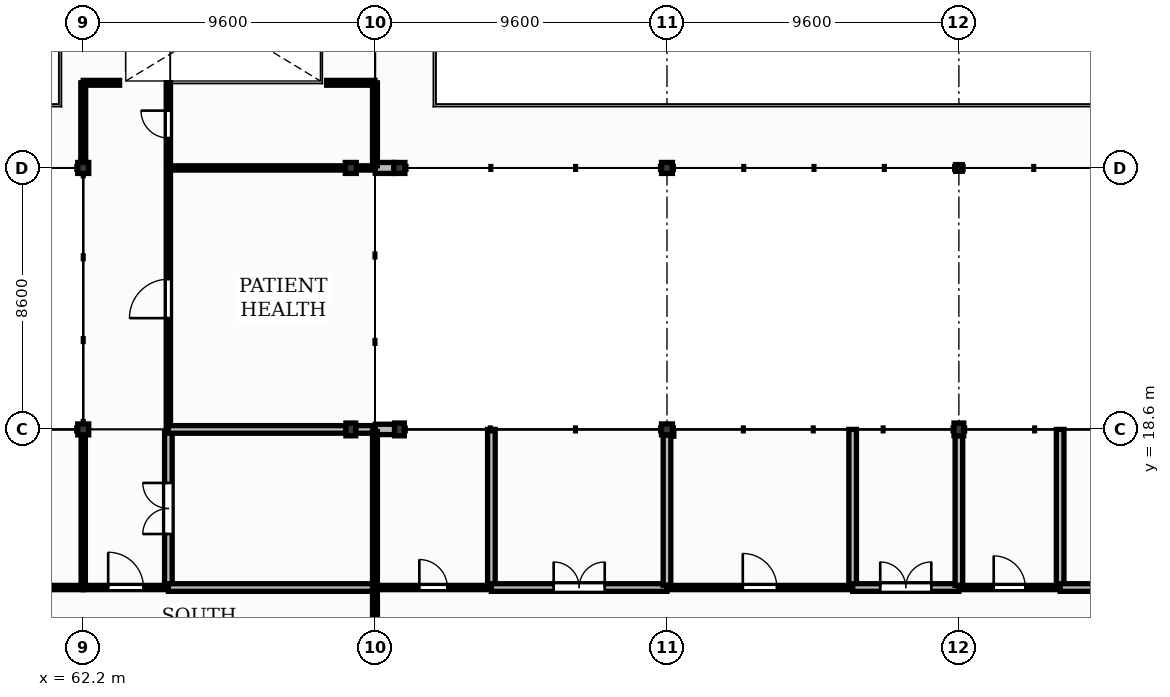
"""IFC4 building model, lengths in metres.
Left out: names, types, materials, properties, quantities, classifications, styles, units other than length and angle.
Written with IfcOpenShell. Run it as: python <this file> out.ifc"""

import sys

from ifc_helpers import new_model, si_unit, direction, frame, frame_2d, origin, origin_2d, place, context, subcontext, project, spatial, rectangle, hollow_circle, extrude, element, fill, save


model = new_model("IFC4")
c1 = context("Model", 3, precision=1e-05, world=origin(), true_north=direction((0.0, 1.0)))
c2 = subcontext(c1, "Body", "Model", "MODEL_VIEW")
j1 = project(units=[si_unit("LENGTHUNIT", "METRE"), si_unit("PLANEANGLEUNIT", "RADIAN")], contexts=[c1])
p1 = place(None, origin())
s1 = spatial("IfcSite", under=j1, at=p1, CompositionType="ELEMENT")
p2 = place(p1, origin())
s2 = spatial("IfcBuilding", under=s1, at=p2, CompositionType="ELEMENT")
p3 = place(p2, frame((0.0, 0.0, 4.5)))
s3 = spatial("IfcBuildingStorey", under=s2, at=p3, CompositionType="ELEMENT", Elevation=4.5)
p4 = place(p3, frame((72.6, 18.6, 0.0), z_axis=(0.0, 0.0, 1.0), x_axis=(1.0, 0.0, 0.0)))
e1 = element("IfcColumn", 1, at=p4, inside=s3, PredefinedType="COLUMN", context=c2, shape_type="SweptSolid", body=[
    extrude(rectangle(XDim=0.32, YDim=0.42, at=origin_2d()), origin(), (0.0, 0.0, 1.0), 4.26),
])
p5 = place(p3, frame((72.6, 27.2, 0.0), z_axis=(0.0, 0.0, 1.0), x_axis=(1.0, 0.0, 0.0)))
e2 = element("IfcColumn", 2, at=p5, inside=s3, PredefinedType="COLUMN", context=c2, shape_type="SweptSolid", body=[
    extrude(rectangle(XDim=0.36, YDim=0.36, at=origin_2d()), origin(), (0.0, 0.0, 1.0), 4.3),
])
p6 = place(p3, frame((81.4, 18.6, 0.0), z_axis=(0.0, 0.0, 1.0), x_axis=(1.0, 0.0, 0.0)))
e3 = element("IfcColumn", 3, at=p6, inside=s3, PredefinedType="COLUMN", context=c2, shape_type="SweptSolid", body=[
    extrude(rectangle(XDim=0.36, YDim=0.36, at=origin_2d()), origin(), (0.0, 0.0, 1.0), 4.26),
])
p7 = place(p3, frame((81.4, 27.2, 0.0), z_axis=(0.0, 0.0, 1.0), x_axis=(1.0, 0.0, 0.0)))
e4 = element("IfcColumn", 4, at=p7, inside=s3, PredefinedType="COLUMN", context=c2, shape_type="SweptSolid", body=[
    extrude(rectangle(XDim=0.36, YDim=0.36, at=origin_2d()), origin(), (0.0, 0.0, 1.0), 4.3),
])
p8 = place(p3, frame((91.0, 18.6, 0.0), z_axis=(0.0, 0.0, 1.0), x_axis=(1.0, 0.0, 0.0)))
e5 = element("IfcColumn", 5, at=p8, inside=s3, PredefinedType="COLUMN", context=c2, shape_type="SweptSolid", body=[
    extrude(rectangle(XDim=0.32, YDim=0.42, at=origin_2d()), origin(), (0.0, 0.0, 1.0), 4.26),
])
p9 = place(p3, frame((91.0, 27.2, 0.0), z_axis=(0.0, 0.0, 1.0), x_axis=(1.0, 0.0, 0.0)))
e6 = element("IfcColumn", 6, at=p9, inside=s3, PredefinedType="COLUMN", context=c2, shape_type="SweptSolid", body=[
    extrude(hollow_circle(Radius=0.11, WallThickness=0.01, at=origin_2d()), origin(), (0.0, 0.0, 1.0), 4.3),
])
p10 = place(p3, frame((62.2, 18.6, 0.0), z_axis=(0.0, 0.0, 1.0), x_axis=(1.0, 0.0, 0.0)))
e7 = element("IfcColumn", 7, at=p10, inside=s3, PredefinedType="COLUMN", context=c2, shape_type="SweptSolid", body=[
    extrude(rectangle(XDim=0.36, YDim=0.36, at=origin_2d()), origin(), (0.0, 0.0, 1.0), 4.26),
])
p11 = place(p3, frame((62.2, 27.2, 0.0), z_axis=(0.0, 0.0, 1.0), x_axis=(1.0, 0.0, 0.0)))
e8 = element("IfcColumn", 8, at=p11, inside=s3, PredefinedType="COLUMN", context=c2, shape_type="SweptSolid", body=[
    extrude(rectangle(XDim=0.36, YDim=0.36, at=origin_2d()), origin(), (0.0, 0.0, 1.0), 4.3),
])
p12 = place(p3, frame((71.0, 18.6, 0.0), z_axis=(0.0, 0.0, 1.0), x_axis=(1.0, 0.0, 0.0)))
e9 = element("IfcColumn", 9, at=p12, inside=s3, PredefinedType="COLUMN", context=c2, shape_type="SweptSolid", body=[
    extrude(rectangle(XDim=0.32, YDim=0.42, at=origin_2d()), origin(), (0.0, 0.0, 1.0), 4.26),
])
p13 = place(p3, frame((71.0, 27.2, 0.0), z_axis=(0.0, 0.0, 1.0), x_axis=(1.0, 0.0, 0.0)))
e10 = element("IfcColumn", 10, at=p13, inside=s3, PredefinedType="COLUMN", context=c2, shape_type="SweptSolid", body=[
    extrude(rectangle(XDim=0.36, YDim=0.36, at=origin_2d()), origin(), (0.0, 0.0, 1.0), 4.3),
])
p14 = place(p3, frame((71.805, 18.6, 0.0), z_axis=(0.0, 0.0, 1.0), x_axis=(1.0, 0.0, 0.0)))
e11 = element("IfcWall", 11, at=p14, inside=s3, PredefinedType="SOLIDWALL", context=c2, shape_type="SweptSolid", body=[
    extrude(rectangle(XDim=0.635, YDim=0.34, at=frame_2d((0.317, 0.0))), origin(), (0.0, 0.0, 1.0), 4.26),
])
p15 = place(p3, frame((71.805, 27.2, 0.0), z_axis=(0.0, 0.0, 1.0), x_axis=(1.0, 0.0, 0.0)))
e12 = element("IfcWall", 12, at=p15, inside=s3, PredefinedType="SOLIDWALL", context=c2, shape_type="SweptSolid", body=[
    extrude(rectangle(XDim=0.615, YDim=0.36, at=frame_2d((0.308, 0.0))), origin(), (0.0, 0.0, 1.0), 4.3),
])
p16 = place(p3, frame((58.233, 13.4, 0.0), z_axis=(0.0, 0.0, 1.0), x_axis=(1.0, 0.0, 0.0)))
e13 = element("IfcWall", 13, at=p16, inside=s3, PredefinedType="PARTITIONING", context=c2, shape_type="SweptSolid", body=[
    extrude(rectangle(XDim=3.967, YDim=0.14, at=frame_2d((1.983, 0.0))), origin(), (0.0, 0.0, 1.0), 4.18),
])
p17 = place(p16, frame((1.404, 0.0, 0.0)))
e14 = element("IfcOpeningElement", 14, at=p17, cuts=e13, PredefinedType="OPENING", context=c2, shape_type="SweptSolid", body=[
    extrude(rectangle(XDim=1.16, YDim=2.1, at=frame_2d((0.58, 1.05))), frame((0.0, 0.08, 0.0), z_axis=(0.0, -1.0, 0.0), x_axis=(1.0, 0.0, 0.0)), (0.0, 0.0, 1.0), 0.16),
])
p18 = place(p3, frame((62.2, 13.47, 0.0), z_axis=(0.0, 0.0, 1.0), x_axis=(0.0, 1.0, 0.0)))
e15 = element("IfcWall", 15, at=p18, inside=s3, PredefinedType="PARTITIONING", context=c2, shape_type="SweptSolid", body=[
    extrude(rectangle(XDim=4.95, YDim=0.14, at=frame_2d((2.475, 0.0))), origin(), (0.0, 0.0, 1.0), 3.74),
])
p19 = place(p3, frame((62.2, 13.4, 0.0), z_axis=(0.0, 0.0, 1.0), x_axis=(1.0, 0.0, 0.0)))
e16 = element("IfcWall", 16, at=p19, inside=s3, PredefinedType="PARTITIONING", context=c2, shape_type="SweptSolid", body=[
    extrude(rectangle(XDim=2.8, YDim=0.14, at=frame_2d((1.4, 0.0))), origin(), (0.0, 0.0, 1.0), 4.18),
])
p20 = place(p19, frame((0.82, 0.0, 0.0)))
e17 = element("IfcOpeningElement", 17, at=p20, cuts=e16, PredefinedType="OPENING", context=c2, shape_type="SweptSolid", body=[
    extrude(rectangle(XDim=1.16, YDim=2.1, at=frame_2d((0.58, 1.05))), frame((0.0, 0.08, 0.0), z_axis=(0.0, -1.0, 0.0), x_axis=(1.0, 0.0, 0.0)), (0.0, 0.0, 1.0), 0.16),
])
p21 = place(p3, frame((65.0, 13.47, 0.0), z_axis=(0.0, 0.0, 1.0), x_axis=(0.0, 1.0, 0.0)))
e18 = element("IfcWall", 18, at=p21, inside=s3, PredefinedType="SOLIDWALL", context=c2, shape_type="SweptSolid", body=[
    extrude(rectangle(XDim=5.06, YDim=0.25, at=frame_2d((2.53, 0.0))), origin(), (0.0, 0.0, 1.0), 4.18),
])
p22 = place(p21, frame((1.69, 0.0, 0.0)))
e19 = element("IfcOpeningElement", 19, at=p22, cuts=e18, PredefinedType="OPENING", context=c2, shape_type="SweptSolid", body=[
    extrude(rectangle(XDim=1.68, YDim=2.3, at=frame_2d((0.84, 1.15))), frame((0.0, 0.135, 0.0), z_axis=(0.0, -1.0, 0.0), x_axis=(1.0, 0.0, 0.0)), (0.0, 0.0, 1.0), 0.27),
])
p23 = place(p3, frame((65.0, 13.4, 0.0), z_axis=(0.0, 0.0, 1.0), x_axis=(1.0, 0.0, 0.0)))
e20 = element("IfcWall", 20, at=p23, inside=s3, PredefinedType="SOLIDWALL", context=c2, shape_type="SweptSolid", body=[
    extrude(rectangle(XDim=6.795, YDim=0.25, at=frame_2d((3.397, 0.0))), origin(), (0.0, 0.0, 1.0), 4.18),
])
p24 = place(p3, frame((65.0, 18.67, 0.0), z_axis=(0.0, 0.0, 1.0), x_axis=(0.0, 1.0, 0.0)))
e21 = element("IfcWall", 21, at=p24, inside=s3, PredefinedType="PARTITIONING", context=c2, shape_type="SweptSolid", body=[
    extrude(rectangle(XDim=8.46, YDim=0.14, at=frame_2d((4.23, 0.0))), origin(), (0.0, 0.0, 1.0), 4.18),
])
p25 = place(p24, frame((3.59, 0.0, 0.0)))
e22 = element("IfcOpeningElement", 22, at=p25, cuts=e21, PredefinedType="OPENING", context=c2, shape_type="SweptSolid", body=[
    extrude(rectangle(XDim=1.28, YDim=2.2, at=frame_2d((0.64, 1.1))), frame((0.0, 0.08, 0.0), z_axis=(0.0, -1.0, 0.0), x_axis=(1.0, 0.0, 0.0)), (0.0, 0.0, 1.0), 0.16),
])
p26 = place(p3, frame((65.0, 18.6, 0.0), z_axis=(0.0, 0.0, 1.0), x_axis=(1.0, 0.0, 0.0)))
e23 = element("IfcWall", 23, at=p26, inside=s3, PredefinedType="SOLIDWALL", context=c2, shape_type="SweptSolid", body=[
    extrude(rectangle(XDim=5.84, YDim=0.25, at=frame_2d((2.92, 0.0))), origin(), (0.0, 0.0, 1.0), 3.8),
])
p27 = place(p3, frame((71.16, 18.6, 0.0), z_axis=(0.0, 0.0, 1.0), x_axis=(1.0, 0.0, 0.0)))
e24 = element("IfcWall", 24, at=p27, inside=s3, PredefinedType="SOLIDWALL", context=c2, shape_type="SweptSolid", body=[
    extrude(rectangle(XDim=0.575, YDim=0.25, at=frame_2d((0.288, 0.0))), origin(), (0.0, 0.0, 1.0), 4.18),
])
p28 = place(p3, frame((65.0, 27.27, 0.0), z_axis=(0.0, 0.0, 1.0), x_axis=(0.0, 1.0, 0.0)))
e25 = element("IfcWall", 25, at=p28, inside=s3, PredefinedType="PARTITIONING", context=c2, shape_type="SweptSolid", body=[
    extrude(rectangle(XDim=2.73, YDim=0.14, at=frame_2d((1.365, 0.0))), origin(), (0.0, 0.0, 1.0), 4.18),
])
p29 = place(p28, frame((0.915, 0.0, 0.0)))
e26 = element("IfcOpeningElement", 26, at=p29, cuts=e25, PredefinedType="OPENING", context=c2, shape_type="SweptSolid", body=[
    extrude(rectangle(XDim=0.9, YDim=2.1, at=frame_2d((0.45, 1.05))), frame((0.0, 0.08, 0.0), z_axis=(0.0, -1.0, 0.0), x_axis=(1.0, 0.0, 0.0)), (0.0, 0.0, 1.0), 0.16),
])
p30 = place(p3, frame((65.0, 27.2, 0.0), z_axis=(0.0, 0.0, 1.0), x_axis=(1.0, 0.0, 0.0)))
e27 = element("IfcWall", 27, at=p30, inside=s3, PredefinedType="PARTITIONING", context=c2, shape_type="SweptSolid", body=[
    extrude(rectangle(XDim=5.82, YDim=0.14, at=frame_2d((2.91, 0.0))), origin(), (0.0, 0.0, 1.0), 3.85),
])
p31 = place(p3, frame((71.18, 27.2, 0.0), z_axis=(0.0, 0.0, 1.0), x_axis=(1.0, 0.0, 0.0)))
e28 = element("IfcWall", 28, at=p31, inside=s3, PredefinedType="PARTITIONING", context=c2, shape_type="SweptSolid", body=[
    extrude(rectangle(XDim=0.615, YDim=0.14, at=frame_2d((0.308, 0.0))), origin(), (0.0, 0.0, 1.0), 4.18),
])
p32 = place(p3, frame((71.805, 13.4, 0.0), z_axis=(0.0, 0.0, 1.0), x_axis=(1.0, 0.0, 0.0)))
e29 = element("IfcWall", 29, at=p32, inside=s3, PredefinedType="PARTITIONING", context=c2, shape_type="SweptSolid", body=[
    extrude(rectangle(XDim=3.819, YDim=0.14, at=frame_2d((1.91, 0.0))), origin(), (0.0, 0.0, 1.0), 4.18),
])
p33 = place(p32, frame((1.449, 0.0, 0.0)))
e30 = element("IfcOpeningElement", 30, at=p33, cuts=e29, PredefinedType="OPENING", context=c2, shape_type="SweptSolid", body=[
    extrude(rectangle(XDim=0.92, YDim=2.1, at=frame_2d((0.46, 1.05))), frame((0.0, 0.08, 0.0), z_axis=(0.0, -1.0, 0.0), x_axis=(1.0, 0.0, 0.0)), (0.0, 0.0, 1.0), 0.16),
])
p34 = place(p3, frame((75.624, 13.47, 0.0), z_axis=(0.0, 0.0, 1.0), x_axis=(0.0, 1.0, 0.0)))
e31 = element("IfcWall", 31, at=p34, inside=s3, PredefinedType="SOLIDWALL", context=c2, shape_type="SweptSolid", body=[
    extrude(rectangle(XDim=5.13, YDim=0.25, at=frame_2d((2.565, 0.0))), origin(), (0.0, 0.0, 1.0), 4.18),
])
p35 = place(p3, frame((75.624, 13.4, 0.0), z_axis=(0.0, 0.0, 1.0), x_axis=(1.0, 0.0, 0.0)))
e32 = element("IfcWall", 32, at=p35, inside=s3, PredefinedType="SOLIDWALL", context=c2, shape_type="SweptSolid", body=[
    extrude(rectangle(XDim=5.776, YDim=0.25, at=frame_2d((2.888, 0.0))), origin(), (0.0, 0.0, 1.0), 4.18),
])
p36 = place(p35, frame((2.048, 0.0, 0.0)))
e33 = element("IfcOpeningElement", 33, at=p36, cuts=e32, PredefinedType="OPENING", context=c2, shape_type="SweptSolid", body=[
    extrude(rectangle(XDim=1.68, YDim=2.3, at=frame_2d((0.84, 1.15))), frame((0.0, 0.135, 0.0), z_axis=(0.0, -1.0, 0.0), x_axis=(1.0, 0.0, 0.0)), (0.0, 0.0, 1.0), 0.27),
])
p37 = place(p3, frame((81.4, 13.47, 0.0), z_axis=(0.0, 0.0, 1.0), x_axis=(0.0, 1.0, 0.0)))
e34 = element("IfcWall", 34, at=p37, inside=s3, PredefinedType="SOLIDWALL", context=c2, shape_type="SweptSolid", body=[
    extrude(rectangle(XDim=4.95, YDim=0.25, at=frame_2d((2.475, 0.0))), origin(), (0.0, 0.0, 1.0), 3.74),
])
p38 = place(p3, frame((81.4, 13.4, 0.0), z_axis=(0.0, 0.0, 1.0), x_axis=(1.0, 0.0, 0.0)))
e35 = element("IfcWall", 35, at=p38, inside=s3, PredefinedType="PARTITIONING", context=c2, shape_type="SweptSolid", body=[
    extrude(rectangle(XDim=6.106, YDim=0.14, at=frame_2d((3.053, 0.0))), origin(), (0.0, 0.0, 1.0), 4.18),
])
p39 = place(p38, frame((2.493, 0.0, 0.0)))
e36 = element("IfcOpeningElement", 36, at=p39, cuts=e35, PredefinedType="OPENING", context=c2, shape_type="SweptSolid", body=[
    extrude(rectangle(XDim=1.12, YDim=2.15, at=frame_2d((0.56, 1.075))), frame((0.0, 0.08, 0.0), z_axis=(0.0, -1.0, 0.0), x_axis=(1.0, 0.0, 0.0)), (0.0, 0.0, 1.0), 0.16),
])
p40 = place(p3, frame((87.506, 13.47, 0.0), z_axis=(0.0, 0.0, 1.0), x_axis=(0.0, 1.0, 0.0)))
e37 = element("IfcWall", 37, at=p40, inside=s3, PredefinedType="SOLIDWALL", context=c2, shape_type="SweptSolid", body=[
    extrude(rectangle(XDim=5.13, YDim=0.25, at=frame_2d((2.565, 0.0))), origin(), (0.0, 0.0, 1.0), 4.18),
])
p41 = place(p3, frame((87.506, 13.4, 0.0), z_axis=(0.0, 0.0, 1.0), x_axis=(1.0, 0.0, 0.0)))
e38 = element("IfcWall", 38, at=p41, inside=s3, PredefinedType="SOLIDWALL", context=c2, shape_type="SweptSolid", body=[
    extrude(rectangle(XDim=3.494, YDim=0.25, at=frame_2d((1.747, 0.0))), origin(), (0.0, 0.0, 1.0), 4.18),
])
p42 = place(p41, frame((0.907, 0.0, 0.0)))
e39 = element("IfcOpeningElement", 39, at=p42, cuts=e38, PredefinedType="OPENING", context=c2, shape_type="SweptSolid", body=[
    extrude(rectangle(XDim=1.68, YDim=2.3, at=frame_2d((0.84, 1.15))), frame((0.0, 0.135, 0.0), z_axis=(0.0, -1.0, 0.0), x_axis=(1.0, 0.0, 0.0)), (0.0, 0.0, 1.0), 0.27),
])
p43 = place(p3, frame((91.0, 13.47, 0.0), z_axis=(0.0, 0.0, 1.0), x_axis=(0.0, 1.0, 0.0)))
e40 = element("IfcWall", 40, at=p43, inside=s3, PredefinedType="SOLIDWALL", context=c2, shape_type="SweptSolid", body=[
    extrude(rectangle(XDim=4.92, YDim=0.25, at=frame_2d((2.46, 0.0))), origin(), (0.0, 0.0, 1.0), 3.74),
])
p44 = place(p3, frame((91.0, 13.4, 0.0), z_axis=(0.0, 0.0, 1.0), x_axis=(1.0, 0.0, 0.0)))
e41 = element("IfcWall", 41, at=p44, inside=s3, PredefinedType="PARTITIONING", context=c2, shape_type="SweptSolid", body=[
    extrude(rectangle(XDim=3.331, YDim=0.14, at=frame_2d((1.666, 0.0))), origin(), (0.0, 0.0, 1.0), 4.18),
])
p45 = place(p44, frame((1.146, 0.0, 0.0)))
e42 = element("IfcOpeningElement", 42, at=p45, cuts=e41, PredefinedType="OPENING", context=c2, shape_type="SweptSolid", body=[
    extrude(rectangle(XDim=1.04, YDim=2.1, at=frame_2d((0.52, 1.05))), frame((0.0, 0.08, 0.0), z_axis=(0.0, -1.0, 0.0), x_axis=(1.0, 0.0, 0.0)), (0.0, 0.0, 1.0), 0.16),
])
p46 = place(p3, frame((94.331, 13.47, 0.0), z_axis=(0.0, 0.0, 1.0), x_axis=(0.0, 1.0, 0.0)))
e43 = element("IfcWall", 43, at=p46, inside=s3, PredefinedType="SOLIDWALL", context=c2, shape_type="SweptSolid", body=[
    extrude(rectangle(XDim=5.13, YDim=0.25, at=frame_2d((2.565, 0.0))), origin(), (0.0, 0.0, 1.0), 4.18),
])
p47 = place(p3, frame((94.331, 13.4, 0.0), z_axis=(0.0, 0.0, 1.0), x_axis=(1.0, 0.0, 0.0)))
e44 = element("IfcWall", 44, at=p47, inside=s3, PredefinedType="SOLIDWALL", context=c2, shape_type="SweptSolid", body=[
    extrude(rectangle(XDim=6.269, YDim=0.25, at=frame_2d((3.135, 0.0))), origin(), (0.0, 0.0, 1.0), 4.18),
])
p48 = place(p47, frame((2.294, 0.0, 0.0)))
e45 = element("IfcOpeningElement", 45, at=p48, cuts=e44, PredefinedType="OPENING", context=c2, shape_type="SweptSolid", body=[
    extrude(rectangle(XDim=1.68, YDim=2.3, at=frame_2d((0.84, 1.15))), frame((0.0, 0.135, 0.0), z_axis=(0.0, -1.0, 0.0), x_axis=(1.0, 0.0, 0.0)), (0.0, 0.0, 1.0), 0.27),
])
p49 = place(p3, frame((71.795, 10.87, 0.0), z_axis=(0.0, 0.0, 1.0), x_axis=(0.0, 1.0, 0.0)))
e46 = element("IfcWall", 46, at=p49, inside=s3, PredefinedType="PARTITIONING", context=c2, shape_type="SweptSolid", body=[
    extrude(rectangle(XDim=2.46, YDim=0.16, at=frame_2d((1.23, 0.0))), origin(), (0.0, 0.0, 1.0), 4.18),
])
p50 = place(p3, frame((63.395, 30.0, 0.0), z_axis=(0.0, 0.0, 1.0), x_axis=(-1.0, 0.0, 0.0)))
e47 = element("IfcWall", 47, at=p50, inside=s3, PredefinedType="PARTITIONING", context=c2, shape_type="SweptSolid", body=[
    extrude(rectangle(XDim=1.195, YDim=0.16, at=frame_2d((0.597, 0.0))), origin(), (0.0, 0.0, 1.0), 4.18),
])
p51 = place(p3, frame((62.2, 27.38, 0.0), z_axis=(0.0, 0.0, 1.0), x_axis=(0.0, 1.0, 0.0)))
e48 = element("IfcWall", 48, at=p51, inside=s3, PredefinedType="PARTITIONING", context=c2, shape_type="SweptSolid", body=[
    extrude(rectangle(XDim=2.62, YDim=0.16, at=frame_2d((1.31, 0.0))), origin(), (0.0, 0.0, 1.0), 4.18),
])
p52 = place(p3, frame((71.795, 27.27, 0.0), z_axis=(0.0, 0.0, 1.0), x_axis=(0.0, 1.0, 0.0)))
e49 = element("IfcWall", 49, at=p52, inside=s3, PredefinedType="PARTITIONING", context=c2, shape_type="SweptSolid", body=[
    extrude(rectangle(XDim=2.73, YDim=0.16, at=frame_2d((1.365, 0.0))), origin(), (0.0, 0.0, 1.0), 4.18),
])
p53 = place(p3, frame((71.795, 30.0, 0.0), z_axis=(0.0, 0.0, 1.0), x_axis=(-1.0, 0.0, 0.0)))
e50 = element("IfcWall", 50, at=p53, inside=s3, PredefinedType="PARTITIONING", context=c2, shape_type="SweptSolid", body=[
    extrude(rectangle(XDim=1.589, YDim=0.16, at=frame_2d((0.795, 0.0))), origin(), (0.0, 0.0, 1.0), 4.18),
])
p54 = place(p3, frame((71.795, 13.47, 0.0), z_axis=(0.0, 0.0, 1.0), x_axis=(0.0, 1.0, 0.0)))
e51 = element("IfcWall", 51, at=p54, inside=s3, PredefinedType="PARTITIONING", context=c2, shape_type="SweptSolid", body=[
    extrude(rectangle(XDim=5.06, YDim=0.16, at=frame_2d((2.53, 0.0))), origin(), (0.0, 0.0, 1.0), 4.18),
])
p55 = place(p20, origin())
e52 = element("IfcDoor", 52, at=p55, inside=s3, OperationType="SINGLE_SWING_LEFT", PredefinedType="DOOR", context=c2, shape_type="SweptSolid", body=[
    extrude(rectangle(XDim=1.16, YDim=2.1, at=frame_2d((0.58, 1.05))), frame((0.0, 0.025, 0.0), z_axis=(0.0, -1.0, 0.0), x_axis=(1.0, 0.0, 0.0)), (0.0, 0.0, 1.0), 0.05),
])
fill(e17, e52)
p56 = place(p29, origin())
e53 = element("IfcDoor", 53, at=p56, inside=s3, OperationType="SINGLE_SWING_RIGHT", PredefinedType="DOOR", context=c2, shape_type="SweptSolid", body=[
    extrude(rectangle(XDim=0.9, YDim=2.1, at=frame_2d((0.45, 1.05))), frame((0.0, 0.025, 0.0), z_axis=(0.0, -1.0, 0.0), x_axis=(1.0, 0.0, 0.0)), (0.0, 0.0, 1.0), 0.05),
])
fill(e26, e53)
p57 = place(p25, origin())
e54 = element("IfcDoor", 54, at=p57, inside=s3, OperationType="SINGLE_SWING_LEFT", PredefinedType="DOOR", context=c2, shape_type="SweptSolid", body=[
    extrude(rectangle(XDim=1.28, YDim=2.2, at=frame_2d((0.64, 1.1))), frame((0.0, 0.025, 0.0), z_axis=(0.0, -1.0, 0.0), x_axis=(1.0, 0.0, 0.0)), (0.0, 0.0, 1.0), 0.05),
])
fill(e22, e54)
p58 = place(p22, origin())
e55 = element("IfcDoor", 55, at=p58, inside=s3, OperationType="DOUBLE_DOOR_SINGLE_SWING", PredefinedType="DOOR", context=c2, shape_type="SweptSolid", body=[
    extrude(rectangle(XDim=1.68, YDim=2.3, at=frame_2d((0.84, 1.15))), frame((0.0, 0.025, 0.0), z_axis=(0.0, -1.0, 0.0), x_axis=(1.0, 0.0, 0.0)), (0.0, 0.0, 1.0), 0.05),
])
fill(e19, e55)
p59 = place(p33, origin())
e56 = element("IfcDoor", 56, at=p59, inside=s3, OperationType="SINGLE_SWING_LEFT", PredefinedType="DOOR", context=c2, shape_type="SweptSolid", body=[
    extrude(rectangle(XDim=0.92, YDim=2.1, at=frame_2d((0.46, 1.05))), frame((0.0, 0.025, 0.0), z_axis=(0.0, -1.0, 0.0), x_axis=(1.0, 0.0, 0.0)), (0.0, 0.0, 1.0), 0.05),
])
fill(e30, e56)
p60 = place(p36, origin())
e57 = element("IfcDoor", 57, at=p60, inside=s3, OperationType="DOUBLE_DOOR_SINGLE_SWING", PredefinedType="DOOR", context=c2, shape_type="SweptSolid", body=[
    extrude(rectangle(XDim=1.68, YDim=2.3, at=frame_2d((0.84, 1.15))), frame((0.0, 0.025, 0.0), z_axis=(0.0, -1.0, 0.0), x_axis=(1.0, 0.0, 0.0)), (0.0, 0.0, 1.0), 0.05),
])
fill(e33, e57)
p61 = place(p39, origin())
e58 = element("IfcDoor", 58, at=p61, inside=s3, OperationType="SINGLE_SWING_LEFT", PredefinedType="DOOR", context=c2, shape_type="SweptSolid", body=[
    extrude(rectangle(XDim=1.12, YDim=2.15, at=frame_2d((0.56, 1.075))), frame((0.0, 0.025, 0.0), z_axis=(0.0, -1.0, 0.0), x_axis=(1.0, 0.0, 0.0)), (0.0, 0.0, 1.0), 0.05),
])
fill(e36, e58)
p62 = place(p42, origin())
e59 = element("IfcDoor", 59, at=p62, inside=s3, OperationType="DOUBLE_DOOR_SINGLE_SWING", PredefinedType="DOOR", context=c2, shape_type="SweptSolid", body=[
    extrude(rectangle(XDim=1.68, YDim=2.3, at=frame_2d((0.84, 1.15))), frame((0.0, 0.025, 0.0), z_axis=(0.0, -1.0, 0.0), x_axis=(1.0, 0.0, 0.0)), (0.0, 0.0, 1.0), 0.05),
])
fill(e39, e59)
p63 = place(p45, origin())
e60 = element("IfcDoor", 60, at=p63, inside=s3, OperationType="SINGLE_SWING_LEFT", PredefinedType="DOOR", context=c2, shape_type="SweptSolid", body=[
    extrude(rectangle(XDim=1.04, YDim=2.1, at=frame_2d((0.52, 1.05))), frame((0.0, 0.025, 0.0), z_axis=(0.0, -1.0, 0.0), x_axis=(1.0, 0.0, 0.0)), (0.0, 0.0, 1.0), 0.05),
])
fill(e42, e60)
save(model, sys.argv[1])
